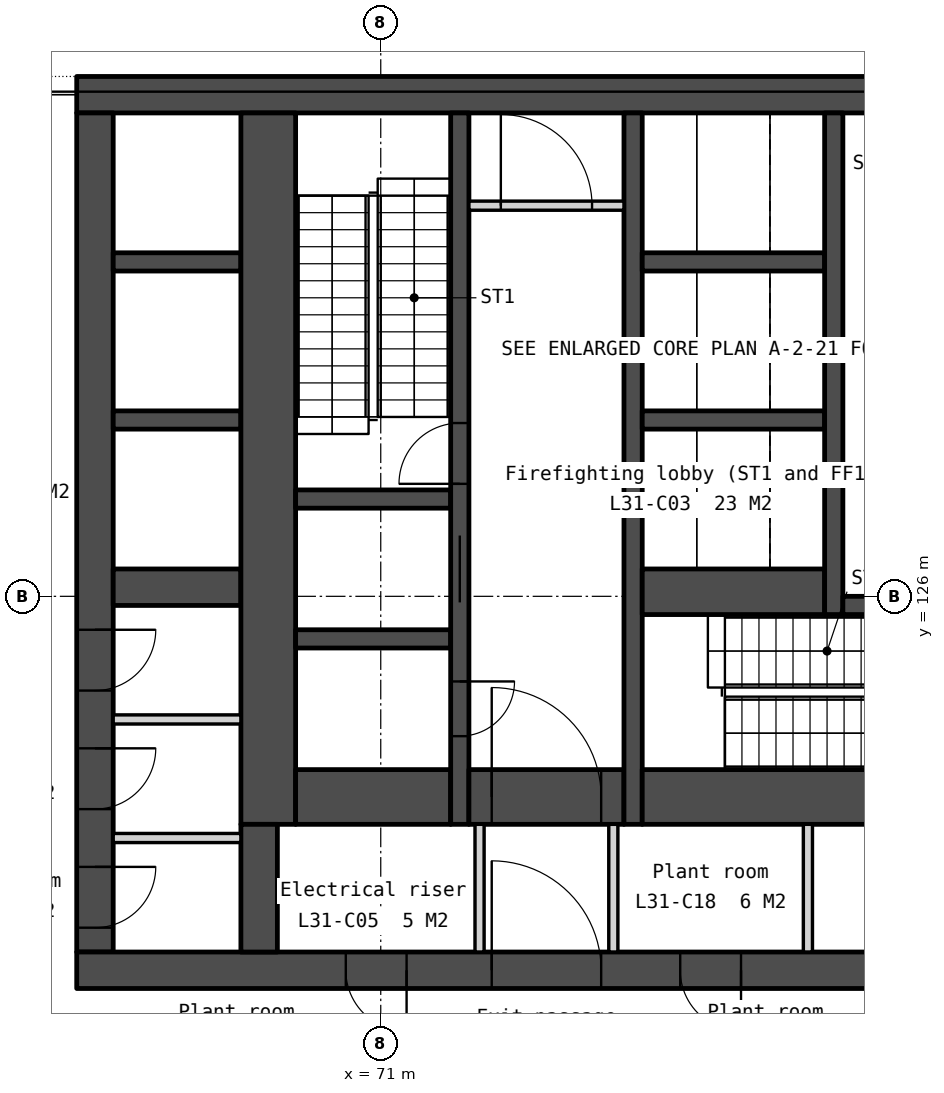
"""IFC4 building model, lengths in metres.
Left out: names, types, materials, properties, quantities, classifications, styles, units other than length and angle.
Written with IfcOpenShell. Run it as: python <this file> out.ifc"""

import sys

from ifc_helpers import new_model, si_unit, direction, frame, frame_2d, origin, place, context, subcontext, project, spatial, rectangle, extrude, element, fill, save


model = new_model("IFC4")
c1 = context("Model", 3, precision=1e-05, world=origin(), true_north=direction((0.0, 1.0)))
c2 = subcontext(c1, "Body", "Model", "MODEL_VIEW")
j1 = project(units=[si_unit("LENGTHUNIT", "METRE"), si_unit("PLANEANGLEUNIT", "RADIAN")], contexts=[c1])
p1 = place(None, origin())
s1 = spatial("IfcSite", under=j1, at=p1, CompositionType="ELEMENT")
p2 = place(p1, origin())
s2 = spatial("IfcBuilding", under=s1, at=p2, CompositionType="ELEMENT")
p3 = place(p2, frame((0.0, 0.0, 123.8)))
s3 = spatial("IfcBuildingStorey", under=s2, at=p3, CompositionType="ELEMENT", Elevation=123.8)
p4 = place(p3, frame((66.0, 134.25, 0.0), z_axis=(0.0, 0.0, 1.0), x_axis=(1.0, 0.0, 0.0)))
e1 = element("IfcWall", 1, at=p4, inside=s3, PredefinedType="SOLIDWALL", context=c2, shape_type="SweptSolid", body=[
    extrude(rectangle(XDim=28.0, YDim=0.6, at=frame_2d((14.0, 0.0))), origin(), (0.0, 0.0, 1.0), 4.35),
])
p5 = place(p3, frame((66.3, 133.95, 0.0), z_axis=(0.0, 0.0, 1.0), x_axis=(0.0, -1.0, 0.0)))
e2 = element("IfcWall", 2, at=p5, inside=s3, PredefinedType="SOLIDWALL", context=c2, shape_type="SweptSolid", body=[
    extrude(rectangle(XDim=13.8, YDim=0.6, at=frame_2d((6.9, 0.0))), origin(), (0.0, 0.0, 1.0), 4.35),
])
p6 = place(p5, frame((12.4, 0.0, 0.0)))
e3 = element("IfcOpeningElement", 3, at=p6, cuts=e2, PredefinedType="OPENING", context=c2, shape_type="SweptSolid", body=[
    extrude(rectangle(XDim=1.0, YDim=2.1, at=frame_2d((0.5, 1.05))), frame((0.0, 0.31, 0.0), z_axis=(0.0, -1.0, 0.0), x_axis=(1.0, 0.0, 0.0)), (0.0, 0.0, 1.0), 0.62),
])
p7 = place(p5, frame((8.5, 0.0, 0.0)))
e4 = element("IfcOpeningElement", 4, at=p7, cuts=e2, PredefinedType="OPENING", context=c2, shape_type="SweptSolid", body=[
    extrude(rectangle(XDim=1.0, YDim=2.1, at=frame_2d((0.5, 1.05))), frame((0.0, 0.31, 0.0), z_axis=(0.0, -1.0, 0.0), x_axis=(1.0, 0.0, 0.0)), (0.0, 0.0, 1.0), 0.62),
])
p8 = place(p5, frame((10.45, 0.0, 0.0)))
e5 = element("IfcOpeningElement", 5, at=p8, cuts=e2, PredefinedType="OPENING", context=c2, shape_type="SweptSolid", body=[
    extrude(rectangle(XDim=1.0, YDim=2.1, at=frame_2d((0.5, 1.05))), frame((0.0, 0.31, 0.0), z_axis=(0.0, -1.0, 0.0), x_axis=(1.0, 0.0, 0.0)), (0.0, 0.0, 1.0), 0.62),
])
p9 = place(p3, frame((66.0, 119.85, 0.0), z_axis=(0.0, 0.0, 1.0), x_axis=(1.0, 0.0, 0.0)))
e6 = element("IfcWall", 6, at=p9, inside=s3, PredefinedType="SOLIDWALL", context=c2, shape_type="SweptSolid", body=[
    extrude(rectangle(XDim=28.0, YDim=0.6, at=frame_2d((14.0, 0.0))), origin(), (0.0, 0.0, 1.0), 4.35),
])
p10 = place(p9, frame((6.825, 0.0, 0.0)))
e7 = element("IfcOpeningElement", 7, at=p10, cuts=e6, PredefinedType="OPENING", context=c2, shape_type="SweptSolid", body=[
    extrude(rectangle(XDim=1.8, YDim=2.1, at=frame_2d((0.9, 1.05))), frame((0.0, 0.31, 0.0), z_axis=(0.0, -1.0, 0.0), x_axis=(1.0, 0.0, 0.0)), (0.0, 0.0, 1.0), 0.62),
])
p11 = place(p9, frame((15.85, 0.0, 0.0)))
e8 = element("IfcOpeningElement", 8, at=p11, cuts=e6, PredefinedType="OPENING", context=c2, shape_type="SweptSolid", body=[
    extrude(rectangle(XDim=1.5, YDim=2.1, at=frame_2d((0.75, 1.05))), frame((0.0, 0.31, 0.0), z_axis=(0.0, -1.0, 0.0), x_axis=(1.0, 0.0, 0.0)), (0.0, 0.0, 1.0), 0.62),
])
p12 = place(p9, frame((19.375, 0.0, 0.0)))
e9 = element("IfcOpeningElement", 9, at=p12, cuts=e6, PredefinedType="OPENING", context=c2, shape_type="SweptSolid", body=[
    extrude(rectangle(XDim=1.8, YDim=2.1, at=frame_2d((0.9, 1.05))), frame((0.0, 0.31, 0.0), z_axis=(0.0, -1.0, 0.0), x_axis=(1.0, 0.0, 0.0)), (0.0, 0.0, 1.0), 0.62),
])
p13 = place(p9, frame((4.425, 0.0, 0.0)))
e10 = element("IfcOpeningElement", 10, at=p13, cuts=e6, PredefinedType="OPENING", context=c2, shape_type="SweptSolid", body=[
    extrude(rectangle(XDim=1.0, YDim=2.1, at=frame_2d((0.5, 1.05))), frame((0.0, 0.31, 0.0), z_axis=(0.0, -1.0, 0.0), x_axis=(1.0, 0.0, 0.0)), (0.0, 0.0, 1.0), 0.62),
])
p14 = place(p9, frame((9.925, 0.0, 0.0)))
e11 = element("IfcOpeningElement", 11, at=p14, cuts=e6, PredefinedType="OPENING", context=c2, shape_type="SweptSolid", body=[
    extrude(rectangle(XDim=1.0, YDim=2.1, at=frame_2d((0.5, 1.05))), frame((0.0, 0.31, 0.0), z_axis=(0.0, -1.0, 0.0), x_axis=(1.0, 0.0, 0.0)), (0.0, 0.0, 1.0), 0.62),
])
p15 = place(p9, frame((13.125, 0.0, 0.0)))
e12 = element("IfcOpeningElement", 12, at=p15, cuts=e6, PredefinedType="OPENING", context=c2, shape_type="SweptSolid", body=[
    extrude(rectangle(XDim=1.0, YDim=2.1, at=frame_2d((0.5, 1.05))), frame((0.0, 0.31, 0.0), z_axis=(0.0, -1.0, 0.0), x_axis=(1.0, 0.0, 0.0)), (0.0, 0.0, 1.0), 0.62),
])
p16 = place(p9, frame((21.725, 0.0, 0.0)))
e13 = element("IfcOpeningElement", 13, at=p16, cuts=e6, PredefinedType="OPENING", context=c2, shape_type="SweptSolid", body=[
    extrude(rectangle(XDim=1.0, YDim=2.1, at=frame_2d((0.5, 1.05))), frame((0.0, 0.31, 0.0), z_axis=(0.0, -1.0, 0.0), x_axis=(1.0, 0.0, 0.0)), (0.0, 0.0, 1.0), 0.62),
])
p17 = place(p9, frame((23.425, 0.0, 0.0)))
e14 = element("IfcOpeningElement", 14, at=p17, cuts=e6, PredefinedType="OPENING", context=c2, shape_type="SweptSolid", body=[
    extrude(rectangle(XDim=1.0, YDim=2.1, at=frame_2d((0.5, 1.05))), frame((0.0, 0.31, 0.0), z_axis=(0.0, -1.0, 0.0), x_axis=(1.0, 0.0, 0.0)), (0.0, 0.0, 1.0), 0.62),
])
for number, where, z_axis, x_axis in (
    (15, (66.6, 131.5, 0.0), (0.0, 0.0, 1.0), (1.0, 0.0, 0.0)),
    (16, (66.6, 128.9, 0.0), (0.0, 0.0, 1.0), (1.0, 0.0, 0.0)),
):
    element("IfcWall", number, at=place(p3, frame(where, z_axis=z_axis, x_axis=x_axis)), inside=s3, PredefinedType="SOLIDWALL", context=c2, shape_type="SweptSolid", body=[
        extrude(rectangle(XDim=2.1, YDim=0.3, at=frame_2d((1.05, 0.0))), origin(), (0.0, 0.0, 1.0), 4.35),
    ])
p18 = place(p3, frame((66.6, 126.15, 0.0), z_axis=(0.0, 0.0, 1.0), x_axis=(1.0, 0.0, 0.0)))
e17 = element("IfcWall", 17, at=p18, inside=s3, PredefinedType="SOLIDWALL", context=c2, shape_type="SweptSolid", body=[
    extrude(rectangle(XDim=2.1, YDim=0.6, at=frame_2d((1.05, 0.0))), origin(), (0.0, 0.0, 1.0), 4.35),
])
for number, where, z_axis, x_axis in (
    (18, (66.6, 123.975, 0.0), (0.0, 0.0, 1.0), (1.0, 0.0, 0.0)),
    (19, (66.6, 122.025, 0.0), (0.0, 0.0, 1.0), (1.0, 0.0, 0.0)),
):
    element("IfcWall", number, at=place(p3, frame(where, z_axis=z_axis, x_axis=x_axis)), inside=s3, PredefinedType="PARTITIONING", context=c2, shape_type="SweptSolid", body=[
        extrude(rectangle(XDim=2.1, YDim=0.15, at=frame_2d((1.05, 0.0))), origin(), (0.0, 0.0, 1.0), 4.35),
    ])
p19 = place(p3, frame((69.15, 133.95, 0.0), z_axis=(0.0, 0.0, 1.0), x_axis=(0.0, -1.0, 0.0)))
e20 = element("IfcWall", 20, at=p19, inside=s3, PredefinedType="SOLIDWALL", context=c2, shape_type="SweptSolid", body=[
    extrude(rectangle(XDim=11.7, YDim=0.9, at=frame_2d((5.85, 0.0))), origin(), (0.0, 0.0, 1.0), 4.35),
])
p20 = place(p3, frame((69.0, 122.25, 0.0), z_axis=(0.0, 0.0, 1.0), x_axis=(0.0, -1.0, 0.0)))
e21 = element("IfcWall", 21, at=p20, inside=s3, PredefinedType="SOLIDWALL", context=c2, shape_type="SweptSolid", body=[
    extrude(rectangle(XDim=2.1, YDim=0.6, at=frame_2d((1.05, 0.0))), origin(), (0.0, 0.0, 1.0), 4.35),
])
for number, where, z_axis, x_axis in (
    (22, (69.6, 127.6, 0.0), (0.0, 0.0, 1.0), (1.0, 0.0, 0.0)),
    (23, (69.6, 125.3, 0.0), (0.0, 0.0, 1.0), (1.0, 0.0, 0.0)),
):
    element("IfcWall", number, at=place(p3, frame(where, z_axis=z_axis, x_axis=x_axis)), inside=s3, PredefinedType="SOLIDWALL", context=c2, shape_type="SweptSolid", body=[
        extrude(rectangle(XDim=2.55, YDim=0.3, at=frame_2d((1.275, 0.0))), origin(), (0.0, 0.0, 1.0), 4.35),
    ])
p21 = place(p3, frame((69.6, 122.7, 0.0), z_axis=(0.0, 0.0, 1.0), x_axis=(1.0, 0.0, 0.0)))
e24 = element("IfcWall", 24, at=p21, inside=s3, PredefinedType="SOLIDWALL", context=c2, shape_type="SweptSolid", body=[
    extrude(rectangle(XDim=2.55, YDim=0.9, at=frame_2d((1.275, 0.0))), origin(), (0.0, 0.0, 1.0), 4.35),
])
p22 = place(p3, frame((72.3, 133.95, 0.0), z_axis=(0.0, 0.0, 1.0), x_axis=(0.0, -1.0, 0.0)))
e25 = element("IfcWall", 25, at=p22, inside=s3, PredefinedType="SOLIDWALL", context=c2, shape_type="SweptSolid", body=[
    extrude(rectangle(XDim=11.7, YDim=0.3, at=frame_2d((5.85, 0.0))), origin(), (0.0, 0.0, 1.0), 4.35),
])
p23 = place(p22, frame((6.95, 0.0, 0.0)))
e26 = element("IfcOpeningElement", 26, at=p23, cuts=e25, PredefinedType="OPENING", context=c2, shape_type="SweptSolid", body=[
    extrude(rectangle(XDim=1.1, YDim=2.1, at=frame_2d((0.55, 1.05))), frame((0.0, 0.16, 0.0), z_axis=(0.0, -1.0, 0.0), x_axis=(1.0, 0.0, 0.0)), (0.0, 0.0, 1.0), 0.32),
])
p24 = place(p22, frame((9.35, 0.0, 0.0)))
e27 = element("IfcOpeningElement", 27, at=p24, cuts=e25, PredefinedType="OPENING", context=c2, shape_type="SweptSolid", body=[
    extrude(rectangle(XDim=0.9, YDim=2.1, at=frame_2d((0.45, 1.05))), frame((0.0, 0.16, 0.0), z_axis=(0.0, -1.0, 0.0), x_axis=(1.0, 0.0, 0.0)), (0.0, 0.0, 1.0), 0.32),
])
p25 = place(p22, frame((5.1, 0.0, 0.0)))
e28 = element("IfcOpeningElement", 28, at=p25, cuts=e25, PredefinedType="OPENING", context=c2, shape_type="SweptSolid", body=[
    extrude(rectangle(XDim=1.0, YDim=2.1, at=frame_2d((0.5, 1.05))), frame((0.0, 0.16, 0.0), z_axis=(0.0, -1.0, 0.0), x_axis=(1.0, 0.0, 0.0)), (0.0, 0.0, 1.0), 0.32),
])
p26 = place(p3, frame((72.45, 132.425, 0.0), z_axis=(0.0, 0.0, 1.0), x_axis=(1.0, 0.0, 0.0)))
e29 = element("IfcWall", 29, at=p26, inside=s3, PredefinedType="PARTITIONING", context=c2, shape_type="SweptSolid", body=[
    extrude(rectangle(XDim=2.55, YDim=0.15, at=frame_2d((1.275, 0.0))), origin(), (0.0, 0.0, 1.0), 4.35),
])
p27 = place(p26, frame((0.525, 0.0, 0.0)))
e30 = element("IfcOpeningElement", 30, at=p27, cuts=e29, PredefinedType="OPENING", context=c2, shape_type="SweptSolid", body=[
    extrude(rectangle(XDim=1.5, YDim=2.1, at=frame_2d((0.75, 1.05))), frame((0.0, 0.085, 0.0), z_axis=(0.0, -1.0, 0.0), x_axis=(1.0, 0.0, 0.0)), (0.0, 0.0, 1.0), 0.17),
])
p28 = place(p3, frame((72.45, 122.7, 0.0), z_axis=(0.0, 0.0, 1.0), x_axis=(1.0, 0.0, 0.0)))
e31 = element("IfcWall", 31, at=p28, inside=s3, PredefinedType="SOLIDWALL", context=c2, shape_type="SweptSolid", body=[
    extrude(rectangle(XDim=2.55, YDim=0.9, at=frame_2d((1.275, 0.0))), origin(), (0.0, 0.0, 1.0), 4.35),
])
p29 = place(p28, frame((0.375, 0.0, 0.0)))
e32 = element("IfcOpeningElement", 32, at=p29, cuts=e31, PredefinedType="OPENING", context=c2, shape_type="SweptSolid", body=[
    extrude(rectangle(XDim=1.8, YDim=2.1, at=frame_2d((0.9, 1.05))), frame((0.0, 0.46, 0.0), z_axis=(0.0, -1.0, 0.0), x_axis=(1.0, 0.0, 0.0)), (0.0, 0.0, 1.0), 0.92),
])
for number, where, z_axis, x_axis in (
    (33, (72.625, 122.25, 0.0), (0.0, 0.0, 1.0), (0.0, -1.0, 0.0)),
    (34, (74.825, 122.25, 0.0), (0.0, 0.0, 1.0), (0.0, -1.0, 0.0)),
):
    element("IfcWall", number, at=place(p3, frame(where, z_axis=z_axis, x_axis=x_axis)), inside=s3, PredefinedType="PARTITIONING", context=c2, shape_type="SweptSolid", body=[
        extrude(rectangle(XDim=2.1, YDim=0.15, at=frame_2d((1.05, 0.0))), origin(), (0.0, 0.0, 1.0), 3.89),
    ])
p30 = place(p3, frame((75.15, 133.95, 0.0), z_axis=(0.0, 0.0, 1.0), x_axis=(0.0, -1.0, 0.0)))
e35 = element("IfcWall", 35, at=p30, inside=s3, PredefinedType="SOLIDWALL", context=c2, shape_type="SweptSolid", body=[
    extrude(rectangle(XDim=11.7, YDim=0.3, at=frame_2d((5.85, 0.0))), origin(), (0.0, 0.0, 1.0), 4.35),
])
for number, where, z_axis, x_axis in (
    (36, (75.3, 131.5, 0.0), (0.0, 0.0, 1.0), (1.0, 0.0, 0.0)),
    (37, (75.3, 128.9, 0.0), (0.0, 0.0, 1.0), (1.0, 0.0, 0.0)),
):
    element("IfcWall", number, at=place(p3, frame(where, z_axis=z_axis, x_axis=x_axis)), inside=s3, PredefinedType="SOLIDWALL", context=c2, shape_type="SweptSolid", body=[
        extrude(rectangle(XDim=3.0, YDim=0.3, at=frame_2d((1.5, 0.0))), origin(), (0.0, 0.0, 1.0), 4.35),
    ])
p31 = place(p3, frame((75.3, 126.075, 0.0), z_axis=(0.0, 0.0, 1.0), x_axis=(1.0, 0.0, 0.0)))
e38 = element("IfcWall", 38, at=p31, inside=s3, PredefinedType="SOLIDWALL", context=c2, shape_type="SweptSolid", body=[
    extrude(rectangle(XDim=3.0, YDim=0.75, at=frame_2d((1.5, 0.0))), origin(), (0.0, 0.0, 1.0), 4.35),
])
p32 = place(p3, frame((75.3, 122.7, 0.0), z_axis=(0.0, 0.0, 1.0), x_axis=(1.0, 0.0, 0.0)))
e39 = element("IfcWall", 39, at=p32, inside=s3, PredefinedType="SOLIDWALL", context=c2, shape_type="SweptSolid", body=[
    extrude(rectangle(XDim=6.2, YDim=0.9, at=frame_2d((3.1, 0.0))), origin(), (0.0, 0.0, 1.0), 4.35),
])
p33 = place(p3, frame((78.025, 122.25, 0.0), z_axis=(0.0, 0.0, 1.0), x_axis=(0.0, -1.0, 0.0)))
e40 = element("IfcWall", 40, at=p33, inside=s3, PredefinedType="PARTITIONING", context=c2, shape_type="SweptSolid", body=[
    extrude(rectangle(XDim=2.1, YDim=0.15, at=frame_2d((1.05, 0.0))), origin(), (0.0, 0.0, 1.0), 3.89),
])
p34 = place(p3, frame((78.45, 133.95, 0.0), z_axis=(0.0, 0.0, 1.0), x_axis=(0.0, -1.0, 0.0)))
e41 = element("IfcWall", 41, at=p34, inside=s3, PredefinedType="SOLIDWALL", context=c2, shape_type="SweptSolid", body=[
    extrude(rectangle(XDim=8.25, YDim=0.3, at=frame_2d((4.125, 0.0))), origin(), (0.0, 0.0, 1.0), 4.35),
])
p35 = place(p3, frame((78.6, 125.85, 0.0), z_axis=(0.0, 0.0, 1.0), x_axis=(1.0, 0.0, 0.0)))
e42 = element("IfcWall", 42, at=p35, inside=s3, PredefinedType="SOLIDWALL", context=c2, shape_type="SweptSolid", body=[
    extrude(rectangle(XDim=3.2, YDim=0.3, at=frame_2d((1.6, 0.0))), origin(), (0.0, 0.0, 1.0), 4.35),
])
p36 = place(p23, origin())
e43 = element("IfcDoor", 43, at=p36, inside=s3, OperationType="SLIDING_TO_LEFT", PredefinedType="DOOR", context=c2, shape_type="SweptSolid", body=[
    extrude(rectangle(XDim=1.1, YDim=2.1, at=frame_2d((0.55, 1.05))), frame((0.0, 0.025, 0.0), z_axis=(0.0, -1.0, 0.0), x_axis=(1.0, 0.0, 0.0)), (0.0, 0.0, 1.0), 0.05),
])
fill(e26, e43)
p37 = place(p29, origin())
e44 = element("IfcDoor", 44, at=p37, inside=s3, OperationType="DOUBLE_DOOR_DOUBLE_SWING", PredefinedType="DOOR", context=c2, shape_type="SweptSolid", body=[
    extrude(rectangle(XDim=1.8, YDim=2.1, at=frame_2d((0.9, 1.05))), frame((0.0, 0.025, 0.0), z_axis=(0.0, -1.0, 0.0), x_axis=(1.0, 0.0, 0.0)), (0.0, 0.0, 1.0), 0.05),
])
fill(e32, e44)
p38 = place(p10, origin())
e45 = element("IfcDoor", 45, at=p38, inside=s3, OperationType="DOUBLE_DOOR_DOUBLE_SWING", PredefinedType="DOOR", context=c2, shape_type="SweptSolid", body=[
    extrude(rectangle(XDim=1.8, YDim=2.1, at=frame_2d((0.9, 1.05))), frame((0.0, 0.025, 0.0), z_axis=(0.0, -1.0, 0.0), x_axis=(1.0, 0.0, 0.0)), (0.0, 0.0, 1.0), 0.05),
])
fill(e7, e45)
p39 = place(p27, origin())
e46 = element("IfcDoor", 46, at=p39, inside=s3, OperationType="DOUBLE_DOOR_DOUBLE_SWING", PredefinedType="DOOR", context=c2, shape_type="SweptSolid", body=[
    extrude(rectangle(XDim=1.5, YDim=2.1, at=frame_2d((0.75, 1.05))), frame((0.0, 0.025, 0.0), z_axis=(0.0, -1.0, 0.0), x_axis=(1.0, 0.0, 0.0)), (0.0, 0.0, 1.0), 0.05),
])
fill(e30, e46)
p40 = place(p24, origin())
e47 = element("IfcDoor", 47, at=p40, inside=s3, OperationType="SINGLE_SWING_LEFT", PredefinedType="DOOR", context=c2, shape_type="SweptSolid", body=[
    extrude(rectangle(XDim=0.9, YDim=2.1, at=frame_2d((0.45, 1.05))), frame((0.0, 0.025, 0.0), z_axis=(0.0, -1.0, 0.0), x_axis=(1.0, 0.0, 0.0)), (0.0, 0.0, 1.0), 0.05),
])
fill(e27, e47)
p41 = place(p13, origin())
e48 = element("IfcDoor", 48, at=p41, inside=s3, OperationType="SINGLE_SWING_RIGHT", PredefinedType="DOOR", context=c2, shape_type="SweptSolid", body=[
    extrude(rectangle(XDim=1.0, YDim=2.1, at=frame_2d((0.5, 1.05))), frame((0.0, 0.025, 0.0), z_axis=(0.0, -1.0, 0.0), x_axis=(1.0, 0.0, 0.0)), (0.0, 0.0, 1.0), 0.05),
])
fill(e10, e48)
p42 = place(p14, origin())
e49 = element("IfcDoor", 49, at=p42, inside=s3, OperationType="SINGLE_SWING_RIGHT", PredefinedType="DOOR", context=c2, shape_type="SweptSolid", body=[
    extrude(rectangle(XDim=1.0, YDim=2.1, at=frame_2d((0.5, 1.05))), frame((0.0, 0.025, 0.0), z_axis=(0.0, -1.0, 0.0), x_axis=(1.0, 0.0, 0.0)), (0.0, 0.0, 1.0), 0.05),
])
fill(e11, e49)
p43 = place(p25, origin())
e50 = element("IfcDoor", 50, at=p43, inside=s3, OperationType="SINGLE_SWING_RIGHT", PredefinedType="DOOR", context=c2, shape_type="SweptSolid", body=[
    extrude(rectangle(XDim=1.0, YDim=2.1, at=frame_2d((0.5, 1.05))), frame((0.0, 0.025, 0.0), z_axis=(0.0, -1.0, 0.0), x_axis=(1.0, 0.0, 0.0)), (0.0, 0.0, 1.0), 0.05),
])
fill(e28, e50)
p44 = place(p6, origin())
e51 = element("IfcDoor", 51, at=p44, inside=s3, OperationType="SINGLE_SWING_LEFT", PredefinedType="DOOR", context=c2, shape_type="SweptSolid", body=[
    extrude(rectangle(XDim=1.0, YDim=2.1, at=frame_2d((0.5, 1.05))), frame((0.0, 0.025, 0.0), z_axis=(0.0, -1.0, 0.0), x_axis=(1.0, 0.0, 0.0)), (0.0, 0.0, 1.0), 0.05),
])
fill(e3, e51)
p45 = place(p7, origin())
e52 = element("IfcDoor", 52, at=p45, inside=s3, OperationType="SINGLE_SWING_LEFT", PredefinedType="DOOR", context=c2, shape_type="SweptSolid", body=[
    extrude(rectangle(XDim=1.0, YDim=2.1, at=frame_2d((0.5, 1.05))), frame((0.0, 0.025, 0.0), z_axis=(0.0, -1.0, 0.0), x_axis=(1.0, 0.0, 0.0)), (0.0, 0.0, 1.0), 0.05),
])
fill(e4, e52)
p46 = place(p8, origin())
e53 = element("IfcDoor", 53, at=p46, inside=s3, OperationType="SINGLE_SWING_LEFT", PredefinedType="DOOR", context=c2, shape_type="SweptSolid", body=[
    extrude(rectangle(XDim=1.0, YDim=2.1, at=frame_2d((0.5, 1.05))), frame((0.0, 0.025, 0.0), z_axis=(0.0, -1.0, 0.0), x_axis=(1.0, 0.0, 0.0)), (0.0, 0.0, 1.0), 0.05),
])
fill(e5, e53)
save(model, sys.argv[1])
